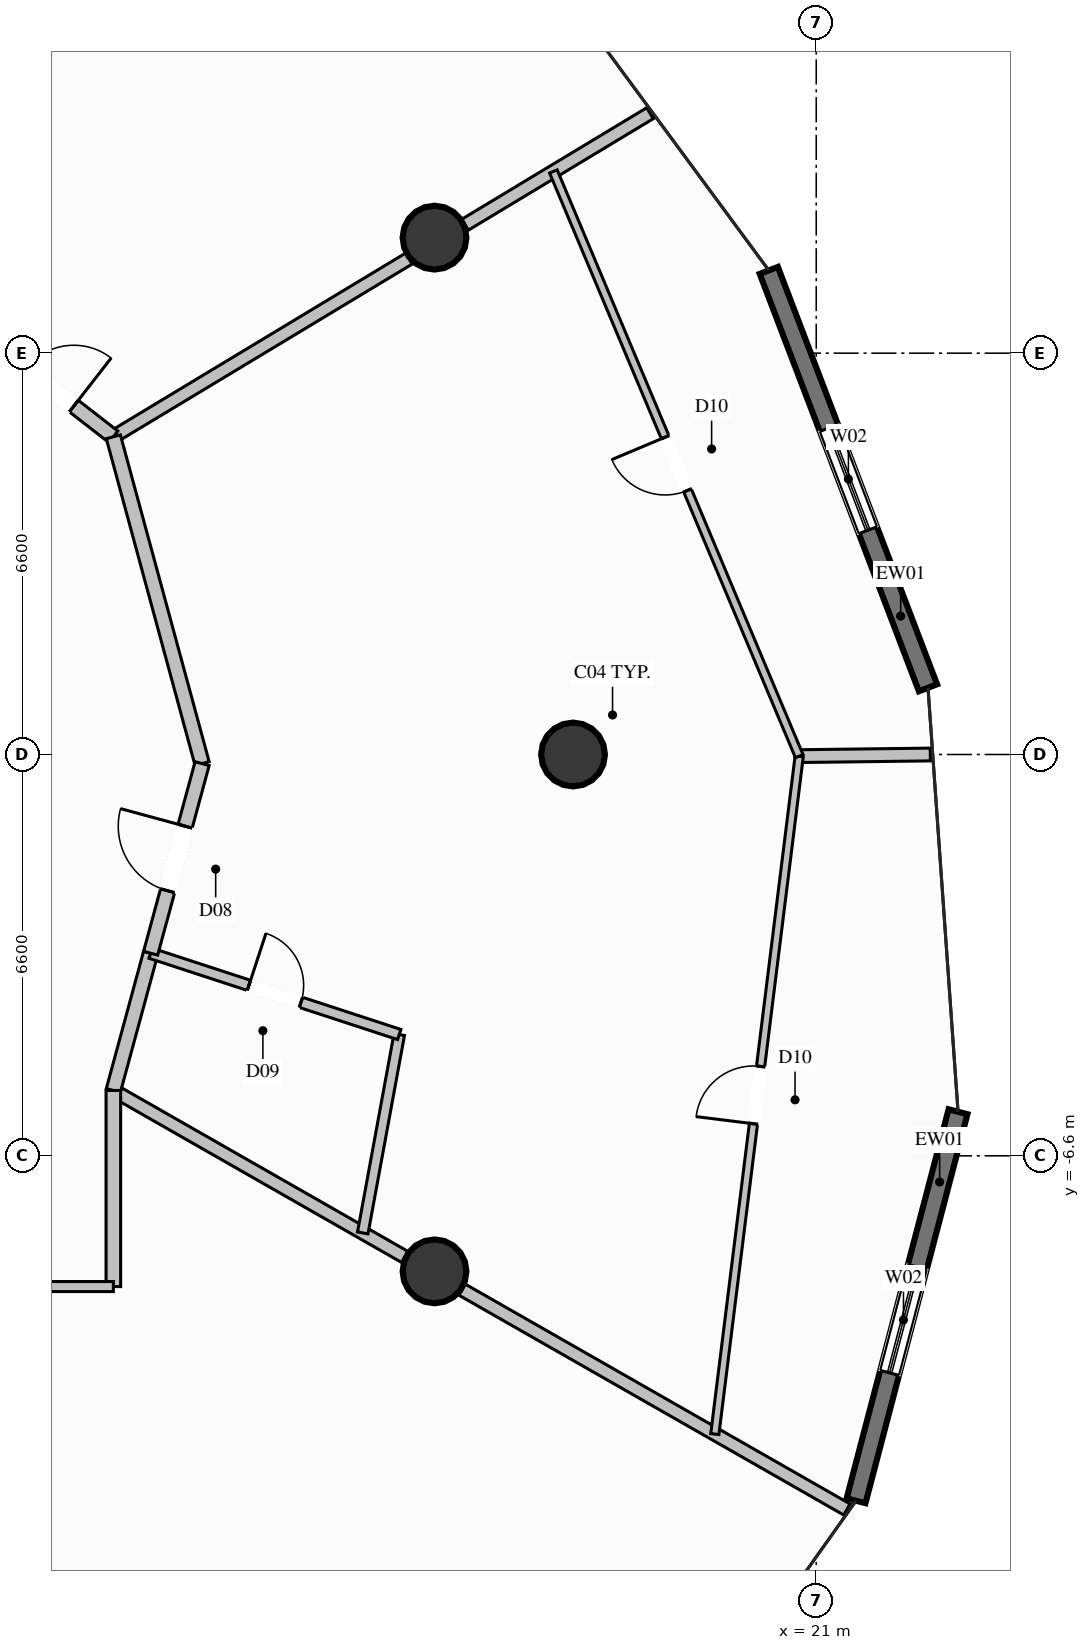
"""IFC4 building model, lengths in metres.
Left out: names, types, materials, properties, quantities, classifications, styles, units other than length and angle.
Written with IfcOpenShell. Run it as: python <this file> out.ifc"""

import sys

from ifc_helpers import new_model, si_unit, direction, frame, frame_2d, origin, origin_2d, place, context, subcontext, project, spatial, rectangle, circle, extrude, element, fill, save


model = new_model("IFC4")
c1 = context("Model", 3, precision=1e-05, world=origin(), true_north=direction((0.0, 1.0)))
c2 = subcontext(c1, "Body", "Model", "MODEL_VIEW")
j1 = project(units=[si_unit("LENGTHUNIT", "METRE"), si_unit("PLANEANGLEUNIT", "RADIAN")], contexts=[c1])
p1 = place(None, origin())
s1 = spatial("IfcSite", under=j1, at=p1, CompositionType="ELEMENT")
p2 = place(p1, origin())
s2 = spatial("IfcBuilding", under=s1, at=p2, CompositionType="ELEMENT")
p3 = place(p2, frame((0.0, 0.0, 149.4)))
s3 = spatial("IfcBuildingStorey", under=s2, at=p3, CompositionType="ELEMENT", Elevation=149.4)
for number, where, z_axis, x_axis in (
    (1, (17.0, 0.0, 0.0), (0.0, 0.0, 1.0), (1.0, 0.0, 0.0)),
    (2, (14.722, 8.5, 0.0), (0.0, 0.0, 1.0), (1.0, 0.0, 0.0)),
    (3, (14.722, -8.5, 0.0), (0.0, 0.0, 1.0), (1.0, 0.0, 0.0)),
):
    element("IfcColumn", number, at=place(p3, frame(where, z_axis=z_axis, x_axis=x_axis)), inside=s3, PredefinedType="COLUMN", context=c2, shape_type="SweptSolid", body=[
        extrude(circle(Radius=0.525, at=origin_2d()), origin(), (0.0, 0.0, 1.0), 3.6),
    ])
p4 = place(p3, frame((23.332, -5.875, 0.0), z_axis=(0.0, 0.0, 1.0), x_axis=(-0.253586412891, -0.967312737018, 0.0)))
e4 = element("IfcWall", 4, at=p4, inside=s3, PredefinedType="SOLIDWALL", context=c2, shape_type="SweptSolid", body=[
    extrude(rectangle(XDim=6.613, YDim=0.32, at=frame_2d((3.307, 0.0))), origin(), (0.0, 0.0, 1.0), 3.35),
])
p5 = place(p4, frame((2.639, 0.0, 0.35)))
e5 = element("IfcOpeningElement", 5, at=p5, cuts=e4, PredefinedType="OPENING", context=c2, shape_type="SweptSolid", body=[
    extrude(rectangle(XDim=1.8, YDim=2.6, at=frame_2d((0.9, 1.3))), frame((0.0, 0.17, 0.0), z_axis=(0.0, -1.0, 0.0), x_axis=(1.0, 0.0, 0.0)), (0.0, 0.0, 1.0), 0.34),
])
p6 = place(p3, frame((20.22, 7.961, 0.0), z_axis=(0.0, 0.0, 1.0), x_axis=(0.356358759138, -0.934349203877, 0.0)))
e6 = element("IfcWall", 6, at=p6, inside=s3, PredefinedType="SOLIDWALL", context=c2, shape_type="SweptSolid", body=[
    extrude(rectangle(XDim=7.346, YDim=0.32, at=frame_2d((3.673, 0.0))), origin(), (0.0, 0.0, 1.0), 3.35),
])
p7 = place(p6, frame((2.773, 0.0, 0.35)))
e7 = element("IfcOpeningElement", 7, at=p7, cuts=e6, PredefinedType="OPENING", context=c2, shape_type="SweptSolid", body=[
    extrude(rectangle(XDim=1.8, YDim=2.6, at=frame_2d((0.9, 1.3))), frame((0.0, 0.17, 0.0), z_axis=(0.0, -1.0, 0.0), x_axis=(1.0, 0.0, 0.0)), (0.0, 0.0, 1.0), 0.34),
])
p8 = place(p3, frame((9.44, 5.225, 0.0), z_axis=(0.0, 0.0, 1.0), x_axis=(0.856412995276, 0.516291372698, 0.0)))
e8 = element("IfcWall", 8, at=p8, inside=s3, PredefinedType="PARTITIONING", context=c2, shape_type="SweptSolid", body=[
    extrude(rectangle(XDim=5.675, YDim=0.21, at=frame_2d((2.837, 0.0))), origin(), (0.0, 0.0, 1.0), 2.717),
])
p9 = place(p3, frame((15.224, 8.712, 0.0), z_axis=(0.0, 0.0, 1.0), x_axis=(0.856399371432, 0.516313970963, 0.0)))
e9 = element("IfcWall", 9, at=p9, inside=s3, PredefinedType="PARTITIONING", context=c2, shape_type="SweptSolid", body=[
    extrude(rectangle(XDim=3.552, YDim=0.21, at=frame_2d((1.776, 0.0))), origin(), (0.0, 0.0, 1.0), 3.35),
])
p10 = place(p3, frame((9.44, -5.525, 0.0), z_axis=(0.0, 0.0, 1.0), x_axis=(0.868338411793, -0.495972179265, 0.0)))
e10 = element("IfcWall", 10, at=p10, inside=s3, PredefinedType="PARTITIONING", context=c2, shape_type="SweptSolid", body=[
    extrude(rectangle(XDim=5.519, YDim=0.21, at=frame_2d((2.759, 0.0))), origin(), (0.0, 0.0, 1.0), 2.717),
])
p11 = place(p3, frame((15.176, -8.801, 0.0), z_axis=(0.0, 0.0, 1.0), x_axis=(0.868298798987, -0.496041526162, 0.0)))
e11 = element("IfcWall", 11, at=p11, inside=s3, PredefinedType="PARTITIONING", context=c2, shape_type="SweptSolid", body=[
    extrude(rectangle(XDim=7.288, YDim=0.21, at=frame_2d((3.644, 0.0))), origin(), (0.0, 0.0, 1.0), 3.35),
])
p12 = place(p3, frame((7.35, 6.85, 0.0), z_axis=(0.0, 0.0, 1.0), x_axis=(0.789431664708, -0.613838453306, 0.0)))
e12 = element("IfcWall", 12, at=p12, inside=s3, PredefinedType="PARTITIONING", context=c2, shape_type="SweptSolid", body=[
    extrude(rectangle(XDim=2.647, YDim=0.24, at=frame_2d((1.324, 0.0))), origin(), (0.0, 0.0, 1.0), 3.35),
])
p13 = place(p12, frame((0.824, 0.0, 0.0)))
e13 = element("IfcOpeningElement", 13, at=p13, cuts=e12, PredefinedType="OPENING", context=c2, shape_type="SweptSolid", body=[
    extrude(rectangle(XDim=1.0, YDim=2.2, at=frame_2d((0.5, 1.1))), frame((0.0, 0.13, 0.0), z_axis=(0.0, -1.0, 0.0), x_axis=(1.0, 0.0, 0.0)), (0.0, 0.0, 1.0), 0.26),
])
p14 = place(p3, frame((9.44, -5.525, 0.0), z_axis=(0.0, 0.0, 1.0), x_axis=(0.262136756532, 0.965030735715, 0.0)))
e14 = element("IfcWall", 14, at=p14, inside=s3, PredefinedType="PARTITIONING", context=c2, shape_type="SweptSolid", body=[
    extrude(rectangle(XDim=2.339, YDim=0.24, at=frame_2d((1.169, 0.0))), origin(), (0.0, 0.0, 1.0), 3.35),
])
p15 = place(p3, frame((13.542, -7.868, 0.0), z_axis=(0.0, 0.0, 1.0), x_axis=(0.180879603069, 0.983505246144, 0.0)))
e15 = element("IfcWall", 15, at=p15, inside=s3, PredefinedType="PLUMBINGWALL", context=c2, shape_type="SweptSolid", body=[
    extrude(rectangle(XDim=3.318, YDim=0.175, at=frame_2d((1.659, 0.0))), origin(), (0.0, 0.0, 1.0), 3.35),
])
p16 = place(p3, frame((10.053, -3.268, 0.0), z_axis=(0.0, 0.0, 1.0), x_axis=(0.950489200724, -0.310757589299, 0.0)))
e16 = element("IfcWall", 16, at=p16, inside=s3, PredefinedType="PLUMBINGWALL", context=c2, shape_type="SweptSolid", body=[
    extrude(rectangle(XDim=4.302, YDim=0.175, at=frame_2d((2.151, 0.0))), origin(), (0.0, 0.0, 1.0), 3.35),
])
p17 = place(p16, frame((1.701, 0.0, 0.0)))
e17 = element("IfcOpeningElement", 17, at=p17, cuts=e16, PredefinedType="OPENING", context=c2, shape_type="SweptSolid", body=[
    extrude(rectangle(XDim=0.9, YDim=2.1, at=frame_2d((0.45, 1.05))), frame((0.0, 0.098, 0.0), z_axis=(0.0, -1.0, 0.0), x_axis=(1.0, 0.0, 0.0)), (0.0, 0.0, 1.0), 0.195),
])
p18 = place(p3, frame((20.72, -0.027, 0.0), z_axis=(0.0, 0.0, 1.0), x_axis=(0.999921014979, 0.012568365153, 0.0)))
e18 = element("IfcWall", 18, at=p18, inside=s3, PredefinedType="PARTITIONING", context=c2, shape_type="SweptSolid", body=[
    extrude(rectangle(XDim=2.156, YDim=0.21, at=frame_2d((1.078, 0.0))), origin(), (0.0, 0.0, 1.0), 3.35),
])
p19 = place(p3, frame((10.9, -0.15, 0.0), z_axis=(0.0, 0.0, 1.0), x_axis=(-0.262123261283, 0.965034401405, 0.0)))
e19 = element("IfcWall", 19, at=p19, inside=s3, PredefinedType="PARTITIONING", context=c2, shape_type="SweptSolid", body=[
    extrude(rectangle(XDim=5.57, YDim=0.24, at=frame_2d((2.785, 0.0))), origin(), (0.0, 0.0, 1.0), 3.35),
])
p20 = place(p3, frame((10.053, -3.268, 0.0), z_axis=(0.0, 0.0, 1.0), x_axis=(0.26211349372, 0.965037054423, 0.0)))
e20 = element("IfcWall", 20, at=p20, inside=s3, PredefinedType="PARTITIONING", context=c2, shape_type="SweptSolid", body=[
    extrude(rectangle(XDim=3.231, YDim=0.24, at=frame_2d((1.616, 0.0))), origin(), (0.0, 0.0, 1.0), 3.35),
])
p21 = place(p20, frame((1.065, 0.0, 0.0)))
e21 = element("IfcOpeningElement", 21, at=p21, cuts=e20, PredefinedType="OPENING", context=c2, shape_type="SweptSolid", body=[
    extrude(rectangle(XDim=1.1, YDim=2.3, at=frame_2d((0.55, 1.15))), frame((0.0, 0.13, 0.0), z_axis=(0.0, -1.0, 0.0), x_axis=(1.0, 0.0, 0.0)), (0.0, 0.0, 1.0), 0.26),
])
p22 = place(p3, frame((19.332, -11.176, 0.0), z_axis=(0.0, 0.0, 1.0), x_axis=(0.123537260256, 0.992339934361, 0.0)))
e22 = element("IfcWall", 22, at=p22, inside=s3, PredefinedType="PARTITIONING", context=c2, shape_type="SweptSolid", body=[
    extrude(rectangle(XDim=11.235, YDim=0.135, at=frame_2d((5.618, 0.0))), origin(), (0.0, 0.0, 1.0), 3.35),
])
p23 = place(p22, frame((5.143, 0.0, 0.0)))
e23 = element("IfcOpeningElement", 23, at=p23, cuts=e22, PredefinedType="OPENING", context=c2, shape_type="SweptSolid", body=[
    extrude(rectangle(XDim=0.95, YDim=2.1, at=frame_2d((0.475, 1.05))), frame((0.0, 0.078, 0.0), z_axis=(0.0, -1.0, 0.0), x_axis=(1.0, 0.0, 0.0)), (0.0, 0.0, 1.0), 0.155),
])
p24 = place(p3, frame((20.72, -0.027, 0.0), z_axis=(0.0, 0.0, 1.0), x_axis=(-0.387613276128, 0.921822080539, 0.0)))
e24 = element("IfcWall", 24, at=p24, inside=s3, PredefinedType="PARTITIONING", context=c2, shape_type="SweptSolid", body=[
    extrude(rectangle(XDim=10.43, YDim=0.135, at=frame_2d((5.215, 0.0))), origin(), (0.0, 0.0, 1.0), 3.35),
])
p25 = place(p24, frame((4.74, 0.0, 0.0)))
e25 = element("IfcOpeningElement", 25, at=p25, cuts=e24, PredefinedType="OPENING", context=c2, shape_type="SweptSolid", body=[
    extrude(rectangle(XDim=0.95, YDim=2.1, at=frame_2d((0.475, 1.05))), frame((0.0, 0.078, 0.0), z_axis=(0.0, -1.0, 0.0), x_axis=(1.0, 0.0, 0.0)), (0.0, 0.0, 1.0), 0.155),
])
p26 = place(p3, frame((9.44, -8.75, 0.0), z_axis=(0.0, 0.0, 1.0), x_axis=(0.0, 1.0, 0.0)))
e26 = element("IfcWall", 26, at=p26, inside=s3, PredefinedType="PARTITIONING", context=c2, shape_type="SweptSolid", body=[
    extrude(rectangle(XDim=3.225, YDim=0.24, at=frame_2d((1.613, 0.0))), origin(), (0.0, 0.0, 1.0), 3.35),
])
p27 = place(p3, frame((0.0, -8.75, 0.0), z_axis=(0.0, 0.0, 1.0), x_axis=(1.0, 0.0, 0.0)))
e27 = element("IfcWall", 27, at=p27, inside=s3, PredefinedType="PARTITIONING", context=c2, shape_type="SweptSolid", body=[
    extrude(rectangle(XDim=9.44, YDim=0.165, at=frame_2d((4.72, 0.0))), origin(), (0.0, 0.0, 1.0), 3.35),
])
p28 = place(p27, frame((4.245, 0.0, 0.0)))
e28 = element("IfcOpeningElement", 28, at=p28, cuts=e27, PredefinedType="OPENING", context=c2, shape_type="SweptSolid", body=[
    extrude(rectangle(XDim=0.95, YDim=2.1, at=frame_2d((0.475, 1.05))), frame((0.0, 0.093, 0.0), z_axis=(0.0, -1.0, 0.0), x_axis=(1.0, 0.0, 0.0)), (0.0, 0.0, 1.0), 0.185),
])
p29 = place(p5, origin())
e29 = element("IfcWindow", 29, at=p29, inside=s3, PartitioningType="SINGLE_PANEL", PredefinedType="WINDOW", context=c2, shape_type="SweptSolid", body=[
    extrude(rectangle(XDim=1.8, YDim=2.6, at=frame_2d((0.9, 1.3))), frame((0.0, 0.03, 0.0), z_axis=(0.0, -1.0, 0.0), x_axis=(1.0, 0.0, 0.0)), (0.0, 0.0, 1.0), 0.06),
])
fill(e5, e29)
p30 = place(p7, origin())
e30 = element("IfcWindow", 30, at=p30, inside=s3, PartitioningType="SINGLE_PANEL", PredefinedType="WINDOW", context=c2, shape_type="SweptSolid", body=[
    extrude(rectangle(XDim=1.8, YDim=2.6, at=frame_2d((0.9, 1.3))), frame((0.0, 0.03, 0.0), z_axis=(0.0, -1.0, 0.0), x_axis=(1.0, 0.0, 0.0)), (0.0, 0.0, 1.0), 0.06),
])
fill(e7, e30)
p31 = place(p13, origin())
e31 = element("IfcDoor", 31, at=p31, inside=s3, OperationType="SINGLE_SWING_RIGHT", PredefinedType="DOOR", context=c2, shape_type="SweptSolid", body=[
    extrude(rectangle(XDim=1.0, YDim=2.2, at=frame_2d((0.5, 1.1))), frame((0.0, 0.025, 0.0), z_axis=(0.0, -1.0, 0.0), x_axis=(1.0, 0.0, 0.0)), (0.0, 0.0, 1.0), 0.05),
])
fill(e13, e31)
p32 = place(p17, origin())
e32 = element("IfcDoor", 32, at=p32, inside=s3, OperationType="SINGLE_SWING_LEFT", PredefinedType="DOOR", context=c2, shape_type="SweptSolid", body=[
    extrude(rectangle(XDim=0.9, YDim=2.1, at=frame_2d((0.45, 1.05))), frame((0.0, 0.025, 0.0), z_axis=(0.0, -1.0, 0.0), x_axis=(1.0, 0.0, 0.0)), (0.0, 0.0, 1.0), 0.05),
])
fill(e17, e32)
p33 = place(p21, origin())
e33 = element("IfcDoor", 33, at=p33, inside=s3, OperationType="SINGLE_SWING_RIGHT", PredefinedType="DOOR", context=c2, shape_type="SweptSolid", body=[
    extrude(rectangle(XDim=1.1, YDim=2.3, at=frame_2d((0.55, 1.15))), frame((0.0, 0.025, 0.0), z_axis=(0.0, -1.0, 0.0), x_axis=(1.0, 0.0, 0.0)), (0.0, 0.0, 1.0), 0.05),
])
fill(e21, e33)
p34 = place(p23, origin())
e34 = element("IfcDoor", 34, at=p34, inside=s3, OperationType="SINGLE_SWING_LEFT", PredefinedType="DOOR", context=c2, shape_type="SweptSolid", body=[
    extrude(rectangle(XDim=0.95, YDim=2.1, at=frame_2d((0.475, 1.05))), frame((0.0, 0.025, 0.0), z_axis=(0.0, -1.0, 0.0), x_axis=(1.0, 0.0, 0.0)), (0.0, 0.0, 1.0), 0.05),
])
fill(e23, e34)
p35 = place(p25, origin())
e35 = element("IfcDoor", 35, at=p35, inside=s3, OperationType="SINGLE_SWING_RIGHT", PredefinedType="DOOR", context=c2, shape_type="SweptSolid", body=[
    extrude(rectangle(XDim=0.95, YDim=2.1, at=frame_2d((0.475, 1.05))), frame((0.0, 0.025, 0.0), z_axis=(0.0, -1.0, 0.0), x_axis=(1.0, 0.0, 0.0)), (0.0, 0.0, 1.0), 0.05),
])
fill(e25, e35)
save(model, sys.argv[1])
